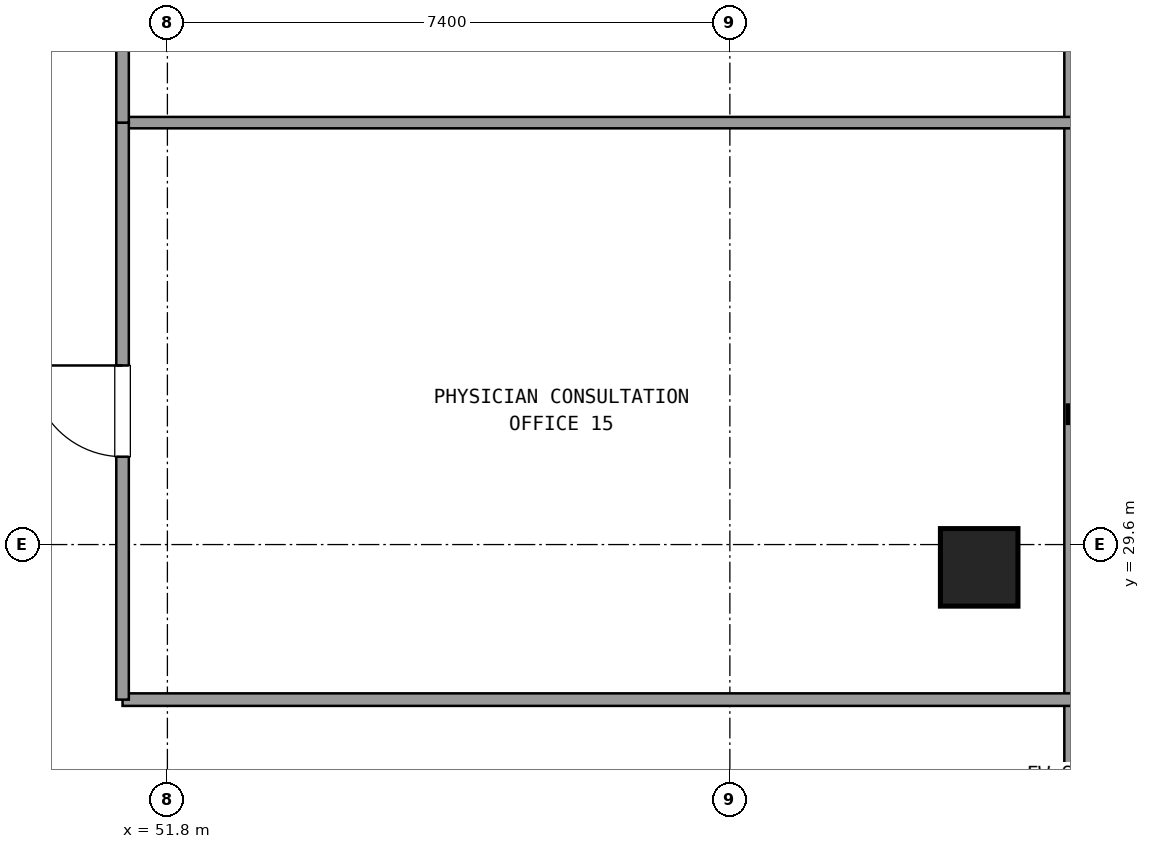
"""IFC4 building model, lengths in metres.
Left out: names, types, materials, properties, quantities, classifications, styles, units other than length and angle.
Written with IfcOpenShell. Run it as: python <this file> out.ifc"""

import sys

from ifc_helpers import new_model, si_unit, direction, frame, frame_2d, origin, origin_2d, place, context, subcontext, project, spatial, rectangle, extrude, element, fill, save


model = new_model("IFC4")
c1 = context("Model", 3, precision=1e-05, world=origin(), true_north=direction((0.0, 1.0)))
c2 = subcontext(c1, "Body", "Model", "MODEL_VIEW")
j1 = project(units=[si_unit("LENGTHUNIT", "METRE"), si_unit("PLANEANGLEUNIT", "RADIAN")], contexts=[c1])
p1 = place(None, origin())
s1 = spatial("IfcSite", under=j1, at=p1, CompositionType="ELEMENT")
p2 = place(p1, origin())
s2 = spatial("IfcBuilding", under=s1, at=p2, CompositionType="ELEMENT")
p3 = place(p2, frame((0.0, 0.0, 88.38)))
s3 = spatial("IfcBuildingStorey", under=s2, at=p3, CompositionType="ELEMENT", Elevation=88.38)
p4 = place(p3, frame((62.48, 29.3, 0.021), z_axis=(-0.084573087246, 0.0, 0.99641727851), x_axis=(0.0, -1.0, 0.0)))
e1 = element("IfcColumn", 1, at=p4, inside=s3, PredefinedType="COLUMN", context=c2, shape_type="SweptSolid", body=[
    extrude(rectangle(XDim=1.02, YDim=1.02, at=origin_2d()), origin(), (0.0, 0.0, 1.0), 3.571),
])
p5 = place(p3, frame((63.72, 9.655, 0.0), z_axis=(0.0, 0.0, 1.0), x_axis=(0.0, 1.0, 0.0)))
e2 = element("IfcWall", 2, at=p5, inside=s3, PredefinedType="SOLIDWALL", context=c2, shape_type="SweptSolid", body=[
    extrude(rectangle(XDim=32.49, YDim=0.24, at=frame_2d((16.245, 0.0))), origin(), (0.0, 0.0, 1.0), 0.85),
])
p6 = place(p3, frame((51.21, 27.56, 0.0), z_axis=(0.0, 0.0, 1.0), x_axis=(1.0, 0.0, 0.0)))
e3 = element("IfcWall", 3, at=p6, inside=s3, PredefinedType="PARTITIONING", context=c2, shape_type="SweptSolid", body=[
    extrude(rectangle(XDim=12.49, YDim=0.165, at=frame_2d((6.245, 0.0))), origin(), (0.0, 0.0, 1.0), 2.61),
])
p7 = place(p3, frame((51.21, 35.151, 0.0), z_axis=(0.0, 0.0, 1.0), x_axis=(1.0, 0.0, 0.0)))
e4 = element("IfcWall", 4, at=p7, inside=s3, PredefinedType="PARTITIONING", context=c2, shape_type="SweptSolid", body=[
    extrude(rectangle(XDim=12.49, YDim=0.15, at=frame_2d((6.245, 0.0))), origin(), (0.0, 0.0, 1.0), 2.61),
])
p8 = place(p3, frame((51.21, 27.56, 0.0), z_axis=(0.0, 0.0, 1.0), x_axis=(0.0, 1.0, 0.0)))
e5 = element("IfcWall", 5, at=p8, inside=s3, PredefinedType="PARTITIONING", context=c2, shape_type="SweptSolid", body=[
    extrude(rectangle(XDim=7.591, YDim=0.165, at=frame_2d((3.795, 0.0))), origin(), (0.0, 0.0, 1.0), 2.61),
])
p9 = place(p8, frame((3.196, 0.0, 0.0)))
e6 = element("IfcOpeningElement", 6, at=p9, cuts=e5, PredefinedType="OPENING", context=c2, shape_type="SweptSolid", body=[
    extrude(rectangle(XDim=1.2, YDim=2.15, at=frame_2d((0.6, 1.075))), frame((0.0, 0.093, 0.0), z_axis=(0.0, -1.0, 0.0), x_axis=(1.0, 0.0, 0.0)), (0.0, 0.0, 1.0), 0.185),
])
p10 = place(p3, frame((51.21, 35.151, 0.0), z_axis=(0.0, 0.0, 1.0), x_axis=(0.0, 1.0, 0.0)))
e7 = element("IfcWall", 7, at=p10, inside=s3, PredefinedType="PARTITIONING", context=c2, shape_type="SweptSolid", body=[
    extrude(rectangle(XDim=5.965, YDim=0.165, at=frame_2d((2.982, 0.0))), origin(), (0.0, 0.0, 1.0), 2.61),
])
p11 = place(p10, frame((2.382, 0.0, 0.0)))
e8 = element("IfcOpeningElement", 8, at=p11, cuts=e7, PredefinedType="OPENING", context=c2, shape_type="SweptSolid", body=[
    extrude(rectangle(XDim=1.2, YDim=2.15, at=frame_2d((0.6, 1.075))), frame((0.0, 0.093, 0.0), z_axis=(0.0, -1.0, 0.0), x_axis=(1.0, 0.0, 0.0)), (0.0, 0.0, 1.0), 0.185),
])
p12 = place(p9, origin())
e9 = element("IfcDoor", 9, at=p12, inside=s3, OperationType="SINGLE_SWING_RIGHT", PredefinedType="DOOR", context=c2, shape_type="SweptSolid", body=[
    extrude(rectangle(XDim=1.2, YDim=2.15, at=frame_2d((0.6, 1.075))), frame((0.0, 0.025, 0.0), z_axis=(0.0, -1.0, 0.0), x_axis=(1.0, 0.0, 0.0)), (0.0, 0.0, 1.0), 0.05),
])
fill(e6, e9)
save(model, sys.argv[1])
